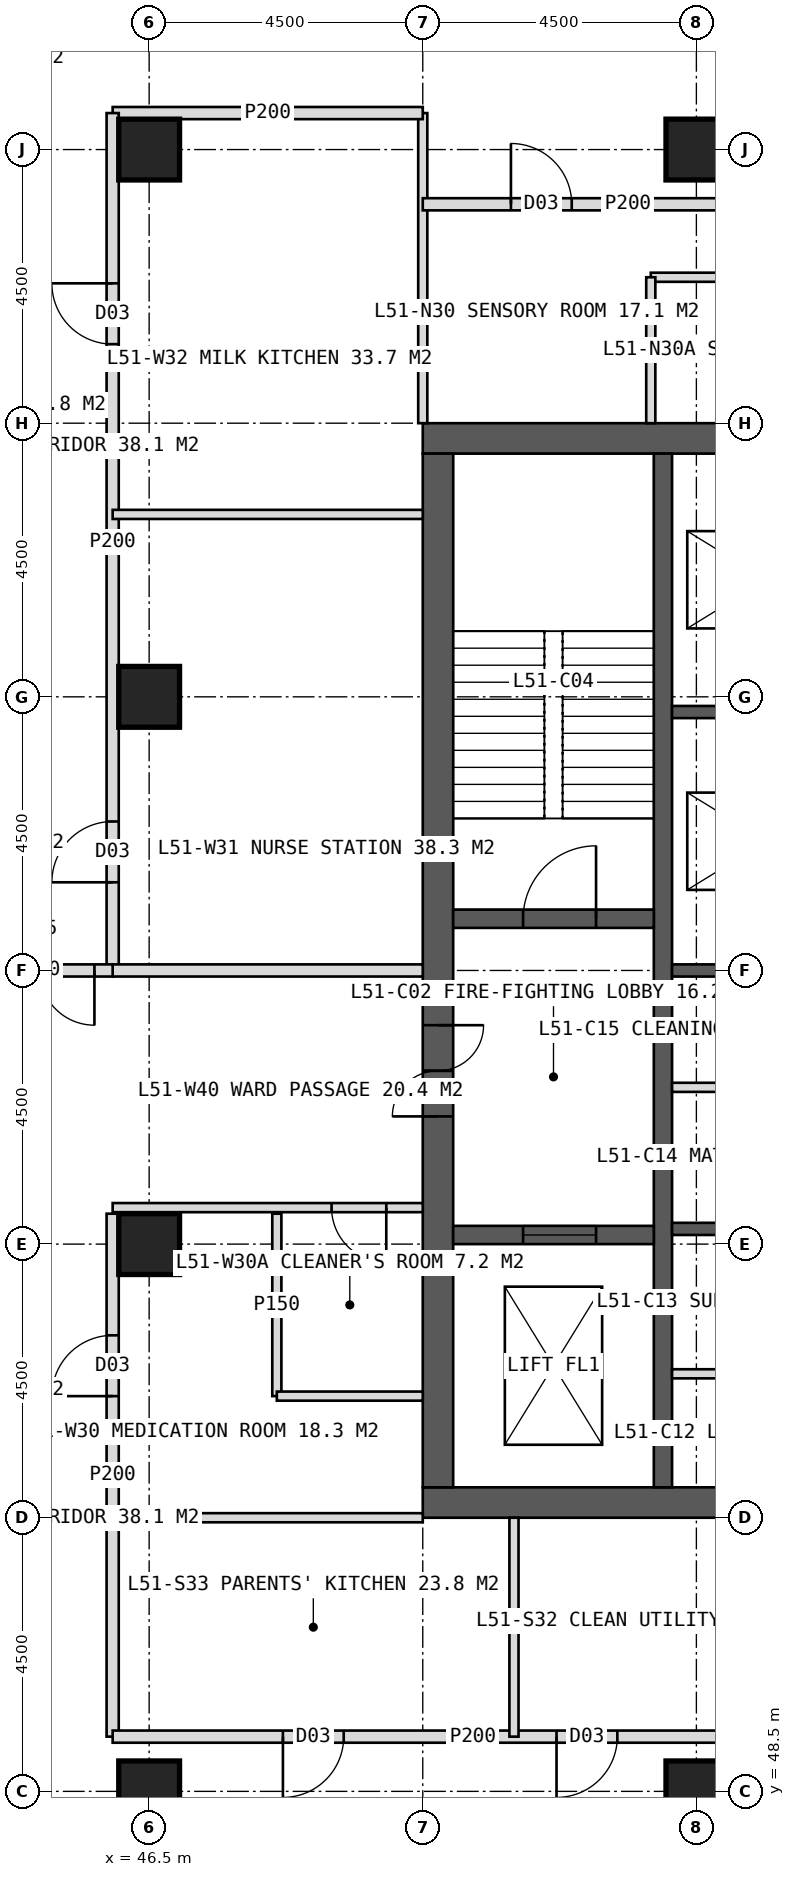
"""IFC4 building model, lengths in metres.
Left out: names, types, materials, properties, quantities, classifications, styles, units other than length and angle.
Written with IfcOpenShell. Run it as: python <this file> out.ifc"""

import sys

from ifc_helpers import new_model, si_unit, direction, frame, frame_2d, origin, origin_2d, place, context, subcontext, project, spatial, rectangle, hollow_rectangle, extrude, element, fill, save


model = new_model("IFC4")
c1 = context("Model", 3, precision=1e-05, world=origin(), true_north=direction((0.0, 1.0)))
c2 = subcontext(c1, "Body", "Model", "MODEL_VIEW")
j1 = project(units=[si_unit("LENGTHUNIT", "METRE"), si_unit("PLANEANGLEUNIT", "RADIAN")], contexts=[c1])
p1 = place(None, origin())
s1 = spatial("IfcSite", under=j1, at=p1, CompositionType="ELEMENT")
p2 = place(p1, origin())
s2 = spatial("IfcBuilding", under=s1, at=p2, CompositionType="ELEMENT")
p3 = place(p2, frame((0.0, 0.0, 213.0)))
s3 = spatial("IfcBuildingStorey", under=s2, at=p3, CompositionType="ELEMENT", Elevation=213.0)
p4 = place(p3, frame((51.0, 70.75, 0.0), z_axis=(0.0, 0.0, 1.0), x_axis=(1.0, 0.0, 0.0)))
e1 = element("IfcWall", 1, at=p4, inside=s3, PredefinedType="SHEAR", context=c2, shape_type="SweptSolid", body=[
    extrude(rectangle(XDim=18.0, YDim=0.5, at=frame_2d((9.0, 0.0))), origin(), (0.0, 0.0, 1.0), 4.0),
])
p5 = place(p4, frame((8.1, 0.0, 0.0)))
e2 = element("IfcOpeningElement", 2, at=p5, cuts=e1, PredefinedType="OPENING", context=c2, shape_type="SweptSolid", body=[
    extrude(rectangle(XDim=1.8, YDim=2.2, at=frame_2d((0.9, 1.1))), frame((0.0, 0.26, 0.0), z_axis=(0.0, -1.0, 0.0), x_axis=(1.0, 0.0, 0.0)), (0.0, 0.0, 1.0), 0.52),
])
p6 = place(p3, frame((51.0, 53.25, 0.0), z_axis=(0.0, 0.0, 1.0), x_axis=(1.0, 0.0, 0.0)))
e3 = element("IfcWall", 3, at=p6, inside=s3, PredefinedType="SHEAR", context=c2, shape_type="SweptSolid", body=[
    extrude(rectangle(XDim=18.0, YDim=0.5, at=frame_2d((9.0, 0.0))), origin(), (0.0, 0.0, 1.0), 4.0),
])
p7 = place(p6, frame((8.1, 0.0, 0.0)))
e4 = element("IfcOpeningElement", 4, at=p7, cuts=e3, PredefinedType="OPENING", context=c2, shape_type="SweptSolid", body=[
    extrude(rectangle(XDim=1.8, YDim=2.2, at=frame_2d((0.9, 1.1))), frame((0.0, 0.26, 0.0), z_axis=(0.0, -1.0, 0.0), x_axis=(1.0, 0.0, 0.0)), (0.0, 0.0, 1.0), 0.52),
])
p8 = place(p3, frame((51.25, 53.5, 0.0), z_axis=(0.0, 0.0, 1.0), x_axis=(0.0, 1.0, 0.0)))
e5 = element("IfcWall", 5, at=p8, inside=s3, PredefinedType="SHEAR", context=c2, shape_type="SweptSolid", body=[
    extrude(rectangle(XDim=17.0, YDim=0.5, at=frame_2d((8.5, 0.0))), origin(), (0.0, 0.0, 1.0), 4.0),
])
p9 = place(p8, frame((6.1, 0.0, 0.0)))
e6 = element("IfcOpeningElement", 6, at=p9, cuts=e5, PredefinedType="OPENING", context=c2, shape_type="SweptSolid", body=[
    extrude(rectangle(XDim=1.5, YDim=2.2, at=frame_2d((0.75, 1.1))), frame((0.0, 0.26, 0.0), z_axis=(0.0, -1.0, 0.0), x_axis=(1.0, 0.0, 0.0)), (0.0, 0.0, 1.0), 0.52),
])
p10 = place(p3, frame((54.95, 53.5, 0.0), z_axis=(0.0, 0.0, 1.0), x_axis=(0.0, 1.0, 0.0)))
e7 = element("IfcWall", 7, at=p10, inside=s3, PredefinedType="SHEAR", context=c2, shape_type="SweptSolid", body=[
    extrude(rectangle(XDim=17.0, YDim=0.3, at=frame_2d((8.5, 0.0))), origin(), (0.0, 0.0, 1.0), 4.0),
])
for number, where, z_axis, x_axis in (
    (8, (55.1, 57.75, 0.0), (0.0, 0.0, 1.0), (1.0, 0.0, 0.0)),
    (9, (55.1, 62.0, 0.0), (0.0, 0.0, 1.0), (1.0, 0.0, 0.0)),
    (10, (55.1, 66.25, 0.0), (0.0, 0.0, 1.0), (1.0, 0.0, 0.0)),
):
    element("IfcWall", number, at=place(p3, frame(where, z_axis=z_axis, x_axis=x_axis)), inside=s3, PredefinedType="SHEAR", context=c2, shape_type="SweptSolid", body=[
        extrude(rectangle(XDim=3.05, YDim=0.2, at=frame_2d((1.525, 0.0))), origin(), (0.0, 0.0, 1.0), 4.0),
    ])
p11 = place(p3, frame((51.5, 62.85, 0.0), z_axis=(0.0, 0.0, 1.0), x_axis=(1.0, 0.0, 0.0)))
e11 = element("IfcWall", 11, at=p11, inside=s3, PredefinedType="SHEAR", context=c2, shape_type="SweptSolid", body=[
    extrude(rectangle(XDim=3.3, YDim=0.3, at=frame_2d((1.65, 0.0))), origin(), (0.0, 0.0, 1.0), 4.0),
])
p12 = place(p11, frame((1.15, 0.0, 0.0)))
e12 = element("IfcOpeningElement", 12, at=p12, cuts=e11, PredefinedType="OPENING", context=c2, shape_type="SweptSolid", body=[
    extrude(rectangle(XDim=1.2, YDim=2.1, at=frame_2d((0.6, 1.05))), frame((0.0, 0.16, 0.0), z_axis=(0.0, -1.0, 0.0), x_axis=(1.0, 0.0, 0.0)), (0.0, 0.0, 1.0), 0.32),
])
p13 = place(p3, frame((51.5, 57.65, 0.0), z_axis=(0.0, 0.0, 1.0), x_axis=(1.0, 0.0, 0.0)))
e13 = element("IfcWall", 13, at=p13, inside=s3, PredefinedType="SHEAR", context=c2, shape_type="SweptSolid", body=[
    extrude(rectangle(XDim=3.3, YDim=0.3, at=frame_2d((1.65, 0.0))), origin(), (0.0, 0.0, 1.0), 4.0),
])
p14 = place(p13, frame((1.15, 0.0, 0.0)))
e14 = element("IfcOpeningElement", 14, at=p14, cuts=e13, PredefinedType="OPENING", context=c2, shape_type="SweptSolid", body=[
    extrude(rectangle(XDim=1.2, YDim=2.2, at=frame_2d((0.6, 1.1))), frame((0.0, 0.16, 0.0), z_axis=(0.0, -1.0, 0.0), x_axis=(1.0, 0.0, 0.0)), (0.0, 0.0, 1.0), 0.32),
])
for number, where, z_axis, x_axis in (
    (15, (46.5, 48.5, 0.0), (0.0, 0.0, 1.0), (1.0, 0.0, 0.0)),
    (16, (46.5, 75.5, 0.0), (0.0, 0.0, 1.0), (1.0, 0.0, 0.0)),
    (17, (55.5, 48.5, 0.0), (0.0, 0.0, 1.0), (1.0, 0.0, 0.0)),
    (18, (55.5, 75.5, 0.0), (0.0, 0.0, 1.0), (1.0, 0.0, 0.0)),
    (19, (46.5, 57.5, 0.0), (0.0, 0.0, 1.0), (1.0, 0.0, 0.0)),
    (20, (46.5, 66.5, 0.0), (0.0, 0.0, 1.0), (1.0, 0.0, 0.0)),
):
    element("IfcColumn", number, at=place(p3, frame(where, z_axis=z_axis, x_axis=x_axis)), inside=s3, PredefinedType="COLUMN", context=c2, shape_type="SweptSolid", body=[
        extrude(hollow_rectangle(XDim=1.0, YDim=1.0, WallThickness=0.1, at=origin_2d()), origin(), (0.0, 0.0, 1.0), 4.0),
    ])
p15 = place(p3, frame((51.0, 71.0, 0.0), z_axis=(0.0, 0.0, 1.0), x_axis=(0.0, 1.0, 0.0)))
e21 = element("IfcWall", 21, at=p15, inside=s3, PredefinedType="PARTITIONING", context=c2, shape_type="SweptSolid", body=[
    extrude(rectangle(XDim=5.1, YDim=0.15, at=frame_2d((2.55, 0.0))), origin(), (0.0, 0.0, 1.0), 3.75),
])
p16 = place(p3, frame((45.9, 76.1, 0.0), z_axis=(0.0, 0.0, 1.0), x_axis=(1.0, 0.0, 0.0)))
e22 = element("IfcWall", 22, at=p16, inside=s3, PredefinedType="PARTITIONING", context=c2, shape_type="SweptSolid", body=[
    extrude(rectangle(XDim=5.1, YDim=0.2, at=frame_2d((2.55, 0.0))), origin(), (0.0, 0.0, 1.0), 3.75),
])
p17 = place(p3, frame((51.0, 74.6, 0.0), z_axis=(0.0, 0.0, 1.0), x_axis=(1.0, 0.0, 0.0)))
e23 = element("IfcWall", 23, at=p17, inside=s3, PredefinedType="PARTITIONING", context=c2, shape_type="SweptSolid", body=[
    extrude(rectangle(XDim=6.75, YDim=0.2, at=frame_2d((3.375, 0.0))), origin(), (0.0, 0.0, 1.0), 3.75),
])
p18 = place(p17, frame((1.45, 0.0, 0.0)))
e24 = element("IfcOpeningElement", 24, at=p18, cuts=e23, PredefinedType="OPENING", context=c2, shape_type="SweptSolid", body=[
    extrude(rectangle(XDim=1.0, YDim=2.1, at=frame_2d((0.5, 1.05))), frame((0.0, 0.11, 0.0), z_axis=(0.0, -1.0, 0.0), x_axis=(1.0, 0.0, 0.0)), (0.0, 0.0, 1.0), 0.22),
])
p19 = place(p3, frame((54.75, 73.4, 0.0), z_axis=(0.0, 0.0, 1.0), x_axis=(1.0, 0.0, 0.0)))
e25 = element("IfcWall", 25, at=p19, inside=s3, PredefinedType="PARTITIONING", context=c2, shape_type="SweptSolid", body=[
    extrude(rectangle(XDim=3.0, YDim=0.15, at=frame_2d((1.5, 0.0))), origin(), (0.0, 0.0, 1.0), 3.75),
])
p20 = place(p3, frame((54.75, 71.0, 0.0), z_axis=(0.0, 0.0, 1.0), x_axis=(0.0, 1.0, 0.0)))
e26 = element("IfcWall", 26, at=p20, inside=s3, PredefinedType="PARTITIONING", context=c2, shape_type="SweptSolid", body=[
    extrude(rectangle(XDim=2.4, YDim=0.15, at=frame_2d((1.2, 0.0))), origin(), (0.0, 0.0, 1.0), 3.75),
])
p21 = place(p3, frame((51.0, 53.0, 0.0), z_axis=(0.0, 0.0, 1.0), x_axis=(-1.0, 0.0, 0.0)))
e27 = element("IfcWall", 27, at=p21, inside=s3, PredefinedType="PARTITIONING", context=c2, shape_type="SweptSolid", body=[
    extrude(rectangle(XDim=5.1, YDim=0.15, at=frame_2d((2.55, 0.0))), origin(), (0.0, 0.0, 1.0), 3.75),
])
p22 = place(p3, frame((45.9, 49.4, 0.0), z_axis=(0.0, 0.0, 1.0), x_axis=(0.0, 1.0, 0.0)))
e28 = element("IfcWall", 28, at=p22, inside=s3, PredefinedType="PARTITIONING", context=c2, shape_type="SweptSolid", body=[
    extrude(rectangle(XDim=8.6, YDim=0.2, at=frame_2d((4.3, 0.0))), origin(), (0.0, 0.0, 1.0), 3.75),
])
p23 = place(p22, frame((5.6, 0.0, 0.0)))
e29 = element("IfcOpeningElement", 29, at=p23, cuts=e28, PredefinedType="OPENING", context=c2, shape_type="SweptSolid", body=[
    extrude(rectangle(XDim=1.0, YDim=2.1, at=frame_2d((0.5, 1.05))), frame((0.0, 0.11, 0.0), z_axis=(0.0, -1.0, 0.0), x_axis=(1.0, 0.0, 0.0)), (0.0, 0.0, 1.0), 0.22),
])
p24 = place(p3, frame((45.9, 62.0, 0.0), z_axis=(0.0, 0.0, 1.0), x_axis=(0.0, 1.0, 0.0)))
e30 = element("IfcWall", 30, at=p24, inside=s3, PredefinedType="PARTITIONING", context=c2, shape_type="SweptSolid", body=[
    extrude(rectangle(XDim=14.1, YDim=0.2, at=frame_2d((7.05, 0.0))), origin(), (0.0, 0.0, 1.0), 3.75),
])
p25 = place(p24, frame((1.45, 0.0, 0.0)))
e31 = element("IfcOpeningElement", 31, at=p25, cuts=e30, PredefinedType="OPENING", context=c2, shape_type="SweptSolid", body=[
    extrude(rectangle(XDim=1.0, YDim=2.1, at=frame_2d((0.5, 1.05))), frame((0.0, 0.11, 0.0), z_axis=(0.0, -1.0, 0.0), x_axis=(1.0, 0.0, 0.0)), (0.0, 0.0, 1.0), 0.22),
])
p26 = place(p24, frame((10.3, 0.0, 0.0)))
e32 = element("IfcOpeningElement", 32, at=p26, cuts=e30, PredefinedType="OPENING", context=c2, shape_type="SweptSolid", body=[
    extrude(rectangle(XDim=1.0, YDim=2.1, at=frame_2d((0.5, 1.05))), frame((0.0, 0.11, 0.0), z_axis=(0.0, -1.0, 0.0), x_axis=(1.0, 0.0, 0.0)), (0.0, 0.0, 1.0), 0.22),
])
p27 = place(p3, frame((51.0, 58.1, 0.0), z_axis=(0.0, 0.0, 1.0), x_axis=(-1.0, 0.0, 0.0)))
e33 = element("IfcWall", 33, at=p27, inside=s3, PredefinedType="PARTITIONING", context=c2, shape_type="SweptSolid", body=[
    extrude(rectangle(XDim=5.1, YDim=0.15, at=frame_2d((2.55, 0.0))), origin(), (0.0, 0.0, 1.0), 3.75),
])
p28 = place(p27, frame((0.6, 0.0, 0.0)))
e34 = element("IfcOpeningElement", 34, at=p28, cuts=e33, PredefinedType="OPENING", context=c2, shape_type="SweptSolid", body=[
    extrude(rectangle(XDim=0.9, YDim=2.1, at=frame_2d((0.45, 1.05))), frame((0.0, 0.085, 0.0), z_axis=(0.0, -1.0, 0.0), x_axis=(1.0, 0.0, 0.0)), (0.0, 0.0, 1.0), 0.17),
])
p29 = place(p3, frame((51.0, 62.0, 0.0), z_axis=(0.0, 0.0, 1.0), x_axis=(-1.0, 0.0, 0.0)))
e35 = element("IfcWall", 35, at=p29, inside=s3, PredefinedType="SOLIDWALL", context=c2, shape_type="SweptSolid", body=[
    extrude(rectangle(XDim=5.1, YDim=0.2, at=frame_2d((2.55, 0.0))), origin(), (0.0, 0.0, 1.0), 2.95),
])
p30 = place(p3, frame((51.0, 69.5, 0.0), z_axis=(0.0, 0.0, 1.0), x_axis=(-1.0, 0.0, 0.0)))
e36 = element("IfcWall", 36, at=p30, inside=s3, PredefinedType="PARTITIONING", context=c2, shape_type="SweptSolid", body=[
    extrude(rectangle(XDim=5.1, YDim=0.15, at=frame_2d((2.55, 0.0))), origin(), (0.0, 0.0, 1.0), 3.75),
])
p31 = place(p3, frame((48.6, 55.0, 0.0), z_axis=(0.0, 0.0, 1.0), x_axis=(0.0, 1.0, 0.0)))
e37 = element("IfcWall", 37, at=p31, inside=s3, PredefinedType="PARTITIONING", context=c2, shape_type="SweptSolid", body=[
    extrude(rectangle(XDim=3.0, YDim=0.15, at=frame_2d((1.5, 0.0))), origin(), (0.0, 0.0, 1.0), 3.75),
])
p32 = place(p3, frame((51.0, 55.0, 0.0), z_axis=(0.0, 0.0, 1.0), x_axis=(-1.0, 0.0, 0.0)))
e38 = element("IfcWall", 38, at=p32, inside=s3, PredefinedType="PARTITIONING", context=c2, shape_type="SweptSolid", body=[
    extrude(rectangle(XDim=2.4, YDim=0.15, at=frame_2d((1.2, 0.0))), origin(), (0.0, 0.0, 1.0), 3.75),
])
p33 = place(p3, frame((57.75, 49.4, 0.0), z_axis=(0.0, 0.0, 1.0), x_axis=(-1.0, 0.0, 0.0)))
e39 = element("IfcWall", 39, at=p33, inside=s3, PredefinedType="PARTITIONING", context=c2, shape_type="SweptSolid", body=[
    extrude(rectangle(XDim=11.85, YDim=0.2, at=frame_2d((5.925, 0.0))), origin(), (0.0, 0.0, 1.0), 3.75),
])
p34 = place(p33, frame((3.55, 0.0, 0.0)))
e40 = element("IfcOpeningElement", 40, at=p34, cuts=e39, PredefinedType="OPENING", context=c2, shape_type="SweptSolid", body=[
    extrude(rectangle(XDim=1.0, YDim=2.1, at=frame_2d((0.5, 1.05))), frame((0.0, 0.11, 0.0), z_axis=(0.0, -1.0, 0.0), x_axis=(1.0, 0.0, 0.0)), (0.0, 0.0, 1.0), 0.22),
])
p35 = place(p33, frame((8.05, 0.0, 0.0)))
e41 = element("IfcOpeningElement", 41, at=p35, cuts=e39, PredefinedType="OPENING", context=c2, shape_type="SweptSolid", body=[
    extrude(rectangle(XDim=1.0, YDim=2.1, at=frame_2d((0.5, 1.05))), frame((0.0, 0.11, 0.0), z_axis=(0.0, -1.0, 0.0), x_axis=(1.0, 0.0, 0.0)), (0.0, 0.0, 1.0), 0.22),
])
p36 = place(p3, frame((52.5, 53.0, 0.0), z_axis=(0.0, 0.0, 1.0), x_axis=(0.0, -1.0, 0.0)))
e42 = element("IfcWall", 42, at=p36, inside=s3, PredefinedType="PARTITIONING", context=c2, shape_type="SweptSolid", body=[
    extrude(rectangle(XDim=3.6, YDim=0.15, at=frame_2d((1.8, 0.0))), origin(), (0.0, 0.0, 1.0), 3.75),
])
p37 = place(p3, frame((45.9, 62.0, 0.0), z_axis=(0.0, 0.0, 1.0), x_axis=(-1.0, 0.0, 0.0)))
e43 = element("IfcWall", 43, at=p37, inside=s3, PredefinedType="SOLIDWALL", context=c2, shape_type="SweptSolid", body=[
    extrude(rectangle(XDim=2.7, YDim=0.2, at=frame_2d((1.35, 0.0))), origin(), (0.0, 0.0, 1.0), 2.95),
])
p38 = place(p37, frame((0.3, 0.0, 0.0)))
e44 = element("IfcOpeningElement", 44, at=p38, cuts=e43, PredefinedType="OPENING", context=c2, shape_type="SweptSolid", body=[
    extrude(rectangle(XDim=1.8, YDim=2.2, at=frame_2d((0.9, 1.1))), frame((0.0, 0.11, 0.0), z_axis=(0.0, -1.0, 0.0), x_axis=(1.0, 0.0, 0.0)), (0.0, 0.0, 1.0), 0.22),
])
for number, where, z_axis, x_axis in (
    (45, (55.1, 55.367, 0.0), (0.0, 0.0, 1.0), (1.0, 0.0, 0.0)),
    (46, (55.1, 60.078, 0.0), (0.0, 0.0, 1.0), (1.0, 0.0, 0.0)),
):
    element("IfcWall", number, at=place(p3, frame(where, z_axis=z_axis, x_axis=x_axis)), inside=s3, PredefinedType="PARTITIONING", context=c2, shape_type="SweptSolid", body=[
        extrude(rectangle(XDim=3.05, YDim=0.15, at=frame_2d((1.525, 0.0))), origin(), (0.0, 0.0, 1.0), 3.75),
    ])
p39 = place(p18, origin())
e47 = element("IfcDoor", 47, at=p39, inside=s3, OperationType="SINGLE_SWING_LEFT", PredefinedType="DOOR", context=c2, shape_type="SweptSolid", body=[
    extrude(rectangle(XDim=1.0, YDim=2.1, at=frame_2d((0.5, 1.05))), frame((0.0, 0.025, 0.0), z_axis=(0.0, -1.0, 0.0), x_axis=(1.0, 0.0, 0.0)), (0.0, 0.0, 1.0), 0.05),
])
fill(e24, e47)
p40 = place(p28, origin())
e48 = element("IfcDoor", 48, at=p40, inside=s3, OperationType="SINGLE_SWING_LEFT", PredefinedType="DOOR", context=c2, shape_type="SweptSolid", body=[
    extrude(rectangle(XDim=0.9, YDim=2.1, at=frame_2d((0.45, 1.05))), frame((0.0, 0.025, 0.0), z_axis=(0.0, -1.0, 0.0), x_axis=(1.0, 0.0, 0.0)), (0.0, 0.0, 1.0), 0.05),
])
fill(e34, e48)
p41 = place(p23, origin())
e49 = element("IfcDoor", 49, at=p41, inside=s3, OperationType="SINGLE_SWING_LEFT", PredefinedType="DOOR", context=c2, shape_type="SweptSolid", body=[
    extrude(rectangle(XDim=1.0, YDim=2.1, at=frame_2d((0.5, 1.05))), frame((0.0, 0.025, 0.0), z_axis=(0.0, -1.0, 0.0), x_axis=(1.0, 0.0, 0.0)), (0.0, 0.0, 1.0), 0.05),
])
fill(e29, e49)
p42 = place(p25, origin())
e50 = element("IfcDoor", 50, at=p42, inside=s3, OperationType="SINGLE_SWING_LEFT", PredefinedType="DOOR", context=c2, shape_type="SweptSolid", body=[
    extrude(rectangle(XDim=1.0, YDim=2.1, at=frame_2d((0.5, 1.05))), frame((0.0, 0.025, 0.0), z_axis=(0.0, -1.0, 0.0), x_axis=(1.0, 0.0, 0.0)), (0.0, 0.0, 1.0), 0.05),
])
fill(e31, e50)
p43 = place(p26, origin())
e51 = element("IfcDoor", 51, at=p43, inside=s3, OperationType="SINGLE_SWING_RIGHT", PredefinedType="DOOR", context=c2, shape_type="SweptSolid", body=[
    extrude(rectangle(XDim=1.0, YDim=2.1, at=frame_2d((0.5, 1.05))), frame((0.0, 0.025, 0.0), z_axis=(0.0, -1.0, 0.0), x_axis=(1.0, 0.0, 0.0)), (0.0, 0.0, 1.0), 0.05),
])
fill(e32, e51)
p44 = place(p34, origin())
e52 = element("IfcDoor", 52, at=p44, inside=s3, OperationType="SINGLE_SWING_RIGHT", PredefinedType="DOOR", context=c2, shape_type="SweptSolid", body=[
    extrude(rectangle(XDim=1.0, YDim=2.1, at=frame_2d((0.5, 1.05))), frame((0.0, 0.025, 0.0), z_axis=(0.0, -1.0, 0.0), x_axis=(1.0, 0.0, 0.0)), (0.0, 0.0, 1.0), 0.05),
])
fill(e40, e52)
p45 = place(p35, origin())
e53 = element("IfcDoor", 53, at=p45, inside=s3, OperationType="SINGLE_SWING_RIGHT", PredefinedType="DOOR", context=c2, shape_type="SweptSolid", body=[
    extrude(rectangle(XDim=1.0, YDim=2.1, at=frame_2d((0.5, 1.05))), frame((0.0, 0.025, 0.0), z_axis=(0.0, -1.0, 0.0), x_axis=(1.0, 0.0, 0.0)), (0.0, 0.0, 1.0), 0.05),
])
fill(e41, e53)
p46 = place(p38, origin())
e54 = element("IfcDoor", 54, at=p46, inside=s3, OperationType="DOUBLE_DOOR_DOUBLE_SWING", PredefinedType="DOOR", context=c2, shape_type="SweptSolid", body=[
    extrude(rectangle(XDim=1.8, YDim=2.2, at=frame_2d((0.9, 1.1))), frame((0.0, 0.025, 0.0), z_axis=(0.0, -1.0, 0.0), x_axis=(1.0, 0.0, 0.0)), (0.0, 0.0, 1.0), 0.05),
])
fill(e44, e54)
p47 = place(p9, origin())
e55 = element("IfcDoor", 55, at=p47, inside=s3, OperationType="DOUBLE_DOOR_SINGLE_SWING", PredefinedType="DOOR", context=c2, shape_type="SweptSolid", body=[
    extrude(rectangle(XDim=1.5, YDim=2.2, at=frame_2d((0.75, 1.1))), frame((0.0, 0.025, 0.0), z_axis=(0.0, -1.0, 0.0), x_axis=(1.0, 0.0, 0.0)), (0.0, 0.0, 1.0), 0.05),
])
fill(e6, e55)
p48 = place(p12, origin())
e56 = element("IfcDoor", 56, at=p48, inside=s3, OperationType="SINGLE_SWING_RIGHT", PredefinedType="DOOR", context=c2, shape_type="SweptSolid", body=[
    extrude(rectangle(XDim=1.2, YDim=2.1, at=frame_2d((0.6, 1.05))), frame((0.0, 0.025, 0.0), z_axis=(0.0, -1.0, 0.0), x_axis=(1.0, 0.0, 0.0)), (0.0, 0.0, 1.0), 0.05),
])
fill(e12, e56)
p49 = place(p14, origin())
e57 = element("IfcDoor", 57, at=p49, inside=s3, OperationType="SLIDING_TO_LEFT", PredefinedType="DOOR", context=c2, shape_type="SweptSolid", body=[
    extrude(rectangle(XDim=1.2, YDim=2.2, at=frame_2d((0.6, 1.1))), frame((0.0, 0.025, 0.0), z_axis=(0.0, -1.0, 0.0), x_axis=(1.0, 0.0, 0.0)), (0.0, 0.0, 1.0), 0.05),
])
fill(e14, e57)
save(model, sys.argv[1])
